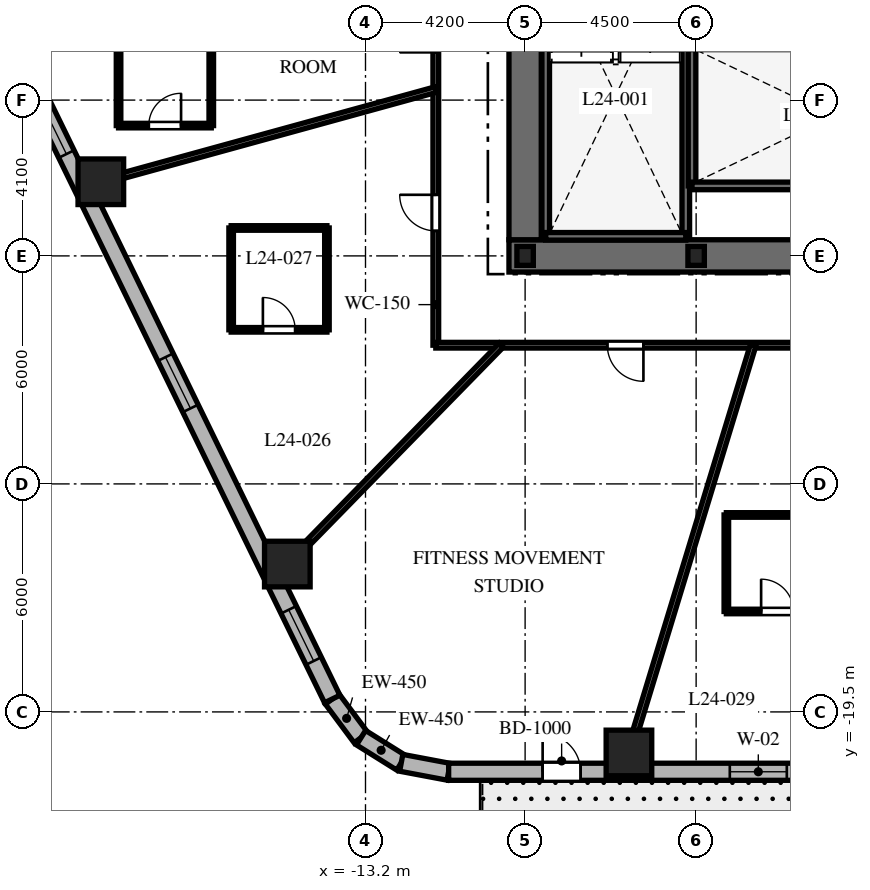
"""IFC4 building model, lengths in metres.
Left out: names, types, materials, properties, quantities, classifications, styles, units other than length and angle.
Written with IfcOpenShell. Run it as: python <this file> out.ifc"""

import sys

from ifc_helpers import new_model, si_unit, direction, frame, frame_2d, origin, origin_2d, place, context, subcontext, project, spatial, rectangle, i_section, extrude, element, fill, save


model = new_model("IFC4")
c1 = context("Model", 3, precision=1e-05, world=origin(), true_north=direction((0.0, 1.0)))
c2 = subcontext(c1, "Body", "Model", "MODEL_VIEW")
j1 = project(units=[si_unit("LENGTHUNIT", "METRE"), si_unit("PLANEANGLEUNIT", "RADIAN")], contexts=[c1])
p1 = place(None, origin())
s1 = spatial("IfcSite", under=j1, at=p1, CompositionType="ELEMENT")
p2 = place(p1, origin())
s2 = spatial("IfcBuilding", under=s1, at=p2, CompositionType="ELEMENT")
p3 = place(p2, frame((0.0, 0.0, 102.5)))
s3 = spatial("IfcBuildingStorey", under=s2, at=p3, CompositionType="ELEMENT", Elevation=102.5)
p4 = place(p3, frame((-9.425, -7.5, 0.0), z_axis=(0.0, 0.0, 1.0), x_axis=(1.0, 0.0, 0.0)))
e1 = element("IfcWall", 1, at=p4, inside=s3, PredefinedType="SHEAR", context=c2, shape_type="SweptSolid", body=[
    extrude(rectangle(XDim=18.85, YDim=0.85, at=frame_2d((9.425, 0.0))), origin(), (0.0, 0.0, 1.0), 3.7),
])
p5 = place(p4, frame((9.475, 0.0, 0.0)))
e2 = element("IfcOpeningElement", 2, at=p5, cuts=e1, PredefinedType="OPENING", context=c2, shape_type="SweptSolid", body=[
    extrude(rectangle(XDim=1.0, YDim=2.15, at=frame_2d((0.5, 1.075))), frame((0.0, 0.435, 0.0), z_axis=(0.0, -1.0, 0.0), x_axis=(1.0, 0.0, 0.0)), (0.0, 0.0, 1.0), 0.87),
])
p6 = place(p3, frame((-9.0, -7.075, 0.0), z_axis=(0.0, 0.0, 1.0), x_axis=(0.0, 1.0, 0.0)))
e3 = element("IfcWall", 3, at=p6, inside=s3, PredefinedType="SHEAR", context=c2, shape_type="SweptSolid", body=[
    extrude(rectangle(XDim=14.15, YDim=0.85, at=frame_2d((7.075, 0.0))), origin(), (0.0, 0.0, 1.0), 3.7),
])
p7 = place(p6, frame((10.2, 0.0, 0.0)))
e4 = element("IfcOpeningElement", 4, at=p7, cuts=e3, PredefinedType="OPENING", context=c2, shape_type="SweptSolid", body=[
    extrude(rectangle(XDim=1.05, YDim=2.15, at=frame_2d((0.525, 1.075))), frame((0.0, 0.435, 0.0), z_axis=(0.0, -1.0, 0.0), x_axis=(1.0, 0.0, 0.0)), (0.0, 0.0, 1.0), 0.87),
])
for number, where, z_axis, x_axis in (
    (5, (-8.458, -6.985, 0.0), (0.0, 0.0, 1.0), (0.0, 1.0, 0.0)),
    (6, (-4.772, -6.985, 0.0), (0.0, 0.0, 1.0), (0.0, 1.0, 0.0)),
):
    element("IfcWall", number, at=place(p3, frame(where, z_axis=z_axis, x_axis=x_axis)), inside=s3, PredefinedType="SHEAR", context=c2, shape_type="SweptSolid", body=[
        extrude(rectangle(XDim=9.143, YDim=0.2, at=frame_2d((4.572, 0.0))), origin(), (0.0, 0.0, 1.0), 3.7),
    ])
for number, where, z_axis, x_axis in (
    (7, (-8.458, -6.985, 0.0), (0.0, 0.0, 1.0), (1.0, 0.0, 0.0)),
    (8, (-4.608, -5.658, 0.0), (0.0, 0.0, 1.0), (0.0, 1.0, 0.0)),
):
    element("IfcWall", number, at=place(p3, frame(where, z_axis=z_axis, x_axis=x_axis)), inside=s3, PredefinedType="SHEAR", context=c2, shape_type="SweptSolid", body=[
        extrude(rectangle(XDim=3.686, YDim=0.2, at=frame_2d((1.843, 0.0))), origin(), (0.0, 0.0, 1.0), 3.7),
    ])
p8 = place(p3, frame((-4.608, -5.658, 0.0), z_axis=(0.0, 0.0, 1.0), x_axis=(1.0, 0.0, 0.0)))
e9 = element("IfcWall", 9, at=p8, inside=s3, PredefinedType="SHEAR", context=c2, shape_type="SweptSolid", body=[
    extrude(rectangle(XDim=9.166, YDim=0.2, at=frame_2d((4.583, 0.0))), origin(), (0.0, 0.0, 1.0), 3.7),
])
p9 = place(p8, frame((7.45, 0.0, 0.0)))
e10 = element("IfcOpeningElement", 10, at=p9, cuts=e9, PredefinedType="OPENING", context=c2, shape_type="SweptSolid", body=[
    extrude(rectangle(XDim=1.0, YDim=2.15, at=frame_2d((0.5, 1.075))), frame((0.0, 0.11, 0.0), z_axis=(0.0, -1.0, 0.0), x_axis=(1.0, 0.0, 0.0)), (0.0, 0.0, 1.0), 0.22),
])
for number, where, z_axis, x_axis in (
    (11, (-9.0, -7.5, 0.0), (0.0, 0.0, 1.0), (1.0, 0.0, 0.0)),
    (12, (-4.5, -7.5, 0.0), (0.0, 0.0, 1.0), (1.0, 0.0, 0.0)),
):
    element("IfcColumn", number, at=place(p3, frame(where, z_axis=z_axis, x_axis=x_axis)), inside=s3, PredefinedType="COLUMN", context=c2, shape_type="SweptSolid", body=[
        extrude(i_section(OverallWidth=0.432, OverallDepth=0.498, WebThickness=0.056, FlangeThickness=0.089, at=origin_2d()), origin(), (0.0, 0.0, 1.0), 3.7),
    ])
for number, where, z_axis, x_axis in (
    (13, (-6.268, -20.58, 0.0), (0.0, 0.0, 1.0), (1.0, 0.0, 0.0)),
    (14, (-20.164, -5.549, 0.0), (0.0, 0.0, 1.0), (1.0, 0.0, 0.0)),
    (15, (-15.257, -15.609, 0.0), (0.0, 0.0, 1.0), (1.0, 0.0, 0.0)),
):
    element("IfcColumn", number, at=place(p3, frame(where, z_axis=z_axis, x_axis=x_axis)), inside=s3, PredefinedType="COLUMN", context=c2, shape_type="SweptSolid", body=[
        extrude(rectangle(XDim=1.2, YDim=1.2, at=origin_2d()), origin(), (0.0, 0.0, 1.0), 3.7),
    ])
p10 = place(p3, frame((-14.076, -19.161, 0.0), z_axis=(0.0, 0.0, 1.0), x_axis=(0.597226657159, -0.802072515412, 0.0)))
e16 = element("IfcWall", 16, at=p10, inside=s3, PredefinedType="SOLIDWALL", context=c2, shape_type="SweptSolid", body=[
    extrude(rectangle(XDim=1.269, YDim=0.45, at=frame_2d((0.635, 0.0))), origin(), (0.0, 0.0, 1.0), 3.4),
])
p11 = place(p3, frame((-13.318, -20.179, 0.0), z_axis=(0.0, 0.0, 1.0), x_axis=(0.848031272749, -0.529946186362, 0.0)))
e17 = element("IfcWall", 17, at=p11, inside=s3, PredefinedType="SOLIDWALL", context=c2, shape_type="SweptSolid", body=[
    extrude(rectangle(XDim=1.248, YDim=0.45, at=frame_2d((0.624, 0.0))), origin(), (0.0, 0.0, 1.0), 3.4),
])
p12 = place(p3, frame((-12.259, -20.84, 0.0), z_axis=(0.0, 0.0, 1.0), x_axis=(0.982730354425, -0.185043374624, 0.0)))
e18 = element("IfcWall", 18, at=p12, inside=s3, PredefinedType="SOLIDWALL", context=c2, shape_type="SweptSolid", body=[
    extrude(rectangle(XDim=1.269, YDim=0.45, at=frame_2d((0.635, 0.0))), origin(), (0.0, 0.0, 1.0), 3.4),
])
p13 = place(p3, frame((-11.012, -21.075, 0.0), z_axis=(0.0, 0.0, 1.0), x_axis=(1.0, 0.0, 0.0)))
e19 = element("IfcWall", 19, at=p13, inside=s3, PredefinedType="SOLIDWALL", context=c2, shape_type="SweptSolid", body=[
    extrude(rectangle(XDim=23.782, YDim=0.45, at=frame_2d((11.891, 0.0))), origin(), (0.0, 0.0, 1.0), 3.4),
])
p14 = place(p13, frame((2.473, 0.0, 0.0)))
e20 = element("IfcOpeningElement", 20, at=p14, cuts=e19, PredefinedType="OPENING", context=c2, shape_type="SweptSolid", body=[
    extrude(rectangle(XDim=1.0, YDim=2.15, at=frame_2d((0.5, 1.075))), frame((0.0, 0.235, 0.0), z_axis=(0.0, -1.0, 0.0), x_axis=(1.0, 0.0, 0.0)), (0.0, 0.0, 1.0), 0.47),
])
p15 = place(p13, frame((7.398, 0.0, 0.8)))
e21 = element("IfcOpeningElement", 21, at=p15, cuts=e19, PredefinedType="OPENING", context=c2, shape_type="SweptSolid", body=[
    extrude(rectangle(XDim=1.5, YDim=1.8, at=frame_2d((0.75, 0.9))), frame((0.0, 0.235, 0.0), z_axis=(0.0, -1.0, 0.0), x_axis=(1.0, 0.0, 0.0)), (0.0, 0.0, 1.0), 0.47),
])
p16 = place(p13, frame((13.966, 0.0, 0.8)))
e22 = element("IfcOpeningElement", 22, at=p16, cuts=e19, PredefinedType="OPENING", context=c2, shape_type="SweptSolid", body=[
    extrude(rectangle(XDim=1.5, YDim=1.8, at=frame_2d((0.75, 0.9))), frame((0.0, 0.235, 0.0), z_axis=(0.0, -1.0, 0.0), x_axis=(1.0, 0.0, 0.0)), (0.0, 0.0, 1.0), 0.47),
])
p17 = place(p13, frame((20.741, 0.0, 0.8)))
e23 = element("IfcOpeningElement", 23, at=p17, cuts=e19, PredefinedType="OPENING", context=c2, shape_type="SweptSolid", body=[
    extrude(rectangle(XDim=1.5, YDim=1.8, at=frame_2d((0.75, 0.9))), frame((0.0, 0.235, 0.0), z_axis=(0.0, -1.0, 0.0), x_axis=(1.0, 0.0, 0.0)), (0.0, 0.0, 1.0), 0.47),
])
p18 = place(p3, frame((-22.238, -2.427, 0.0), z_axis=(0.0, 0.0, 1.0), x_axis=(0.438374803278, -0.898792262901, 0.0)))
e24 = element("IfcWall", 24, at=p18, inside=s3, PredefinedType="SOLIDWALL", context=c2, shape_type="SweptSolid", body=[
    extrude(rectangle(XDim=18.618, YDim=0.45, at=frame_2d((9.309, 0.0))), origin(), (0.0, 0.0, 1.0), 3.4),
])
p19 = place(p18, frame((1.163, 0.0, 0.8)))
e25 = element("IfcOpeningElement", 25, at=p19, cuts=e24, PredefinedType="OPENING", context=c2, shape_type="SweptSolid", body=[
    extrude(rectangle(XDim=1.5, YDim=1.8, at=frame_2d((0.75, 0.9))), frame((0.0, 0.235, 0.0), z_axis=(0.0, -1.0, 0.0), x_axis=(1.0, 0.0, 0.0)), (0.0, 0.0, 1.0), 0.47),
])
p20 = place(p18, frame((8.61, 0.0, 0.8)))
e26 = element("IfcOpeningElement", 26, at=p20, cuts=e24, PredefinedType="OPENING", context=c2, shape_type="SweptSolid", body=[
    extrude(rectangle(XDim=1.5, YDim=1.8, at=frame_2d((0.75, 0.9))), frame((0.0, 0.235, 0.0), z_axis=(0.0, -1.0, 0.0), x_axis=(1.0, 0.0, 0.0)), (0.0, 0.0, 1.0), 0.47),
])
p21 = place(p18, frame((16.006, 0.0, 0.8)))
e27 = element("IfcOpeningElement", 27, at=p21, cuts=e24, PredefinedType="OPENING", context=c2, shape_type="SweptSolid", body=[
    extrude(rectangle(XDim=1.5, YDim=1.8, at=frame_2d((0.75, 0.9))), frame((0.0, 0.235, 0.0), z_axis=(0.0, -1.0, 0.0), x_axis=(1.0, 0.0, 0.0)), (0.0, 0.0, 1.0), 0.47),
])
p22 = place(p3, frame((-11.35, -9.85, 0.0), z_axis=(0.0, 0.0, 1.0), x_axis=(0.0, 1.0, 0.0)))
e28 = element("IfcWall", 28, at=p22, inside=s3, PredefinedType="PARTITIONING", context=c2, shape_type="SweptSolid", body=[
    extrude(rectangle(XDim=19.7, YDim=0.15, at=frame_2d((9.85, 0.0))), origin(), (0.0, 0.0, 1.0), 2.84),
])
p23 = place(p22, frame((16.711, 0.0, 0.0)))
e29 = element("IfcOpeningElement", 29, at=p23, cuts=e28, PredefinedType="OPENING", context=c2, shape_type="SweptSolid", body=[
    extrude(rectangle(XDim=0.95, YDim=2.03, at=frame_2d((0.475, 1.015))), frame((0.0, 0.085, 0.0), z_axis=(0.0, -1.0, 0.0), x_axis=(1.0, 0.0, 0.0)), (0.0, 0.0, 1.0), 0.17),
])
p24 = place(p22, frame((12.968, 0.0, 0.0)))
e30 = element("IfcOpeningElement", 30, at=p24, cuts=e28, PredefinedType="OPENING", context=c2, shape_type="SweptSolid", body=[
    extrude(rectangle(XDim=0.9, YDim=2.03, at=frame_2d((0.45, 1.015))), frame((0.0, 0.085, 0.0), z_axis=(0.0, -1.0, 0.0), x_axis=(1.0, 0.0, 0.0)), (0.0, 0.0, 1.0), 0.17),
])
p25 = place(p22, frame((10.325, 0.0, 0.0)))
e31 = element("IfcOpeningElement", 31, at=p25, cuts=e28, PredefinedType="OPENING", context=c2, shape_type="SweptSolid", body=[
    extrude(rectangle(XDim=0.9, YDim=2.03, at=frame_2d((0.45, 1.015))), frame((0.0, 0.085, 0.0), z_axis=(0.0, -1.0, 0.0), x_axis=(1.0, 0.0, 0.0)), (0.0, 0.0, 1.0), 0.17),
])
p26 = place(p22, frame((7.706, 0.0, 0.0)))
e32 = element("IfcOpeningElement", 32, at=p26, cuts=e28, PredefinedType="OPENING", context=c2, shape_type="SweptSolid", body=[
    extrude(rectangle(XDim=0.95, YDim=2.03, at=frame_2d((0.475, 1.015))), frame((0.0, 0.085, 0.0), z_axis=(0.0, -1.0, 0.0), x_axis=(1.0, 0.0, 0.0)), (0.0, 0.0, 1.0), 0.17),
])
p27 = place(p22, frame((3.008, 0.0, 0.0)))
e33 = element("IfcOpeningElement", 33, at=p27, cuts=e28, PredefinedType="OPENING", context=c2, shape_type="SweptSolid", body=[
    extrude(rectangle(XDim=0.95, YDim=2.03, at=frame_2d((0.475, 1.015))), frame((0.0, 0.085, 0.0), z_axis=(0.0, -1.0, 0.0), x_axis=(1.0, 0.0, 0.0)), (0.0, 0.0, 1.0), 0.17),
])
p28 = place(p3, frame((11.35, -9.85, 0.0), z_axis=(0.0, 0.0, 1.0), x_axis=(-1.0, 0.0, 0.0)))
e34 = element("IfcWall", 34, at=p28, inside=s3, PredefinedType="PARTITIONING", context=c2, shape_type="SweptSolid", body=[
    extrude(rectangle(XDim=22.7, YDim=0.15, at=frame_2d((11.35, 0.0))), origin(), (0.0, 0.0, 1.0), 2.84),
])
p29 = place(p28, frame((17.237, 0.0, 0.0)))
e35 = element("IfcOpeningElement", 35, at=p29, cuts=e34, PredefinedType="OPENING", context=c2, shape_type="SweptSolid", body=[
    extrude(rectangle(XDim=0.95, YDim=2.03, at=frame_2d((0.475, 1.015))), frame((0.0, 0.085, 0.0), z_axis=(0.0, -1.0, 0.0), x_axis=(1.0, 0.0, 0.0)), (0.0, 0.0, 1.0), 0.17),
])
p30 = place(p28, frame((12.39, 0.0, 0.0)))
e36 = element("IfcOpeningElement", 36, at=p30, cuts=e34, PredefinedType="OPENING", context=c2, shape_type="SweptSolid", body=[
    extrude(rectangle(XDim=0.95, YDim=2.03, at=frame_2d((0.475, 1.015))), frame((0.0, 0.085, 0.0), z_axis=(0.0, -1.0, 0.0), x_axis=(1.0, 0.0, 0.0)), (0.0, 0.0, 1.0), 0.17),
])
p31 = place(p28, frame((8.954, 0.0, 0.0)))
e37 = element("IfcOpeningElement", 37, at=p31, cuts=e34, PredefinedType="OPENING", context=c2, shape_type="SweptSolid", body=[
    extrude(rectangle(XDim=0.95, YDim=2.03, at=frame_2d((0.475, 1.015))), frame((0.0, 0.085, 0.0), z_axis=(0.0, -1.0, 0.0), x_axis=(1.0, 0.0, 0.0)), (0.0, 0.0, 1.0), 0.17),
])
p32 = place(p28, frame((5.522, 0.0, 0.0)))
e38 = element("IfcOpeningElement", 38, at=p32, cuts=e34, PredefinedType="OPENING", context=c2, shape_type="SweptSolid", body=[
    extrude(rectangle(XDim=0.9, YDim=2.03, at=frame_2d((0.45, 1.015))), frame((0.0, 0.085, 0.0), z_axis=(0.0, -1.0, 0.0), x_axis=(1.0, 0.0, 0.0)), (0.0, 0.0, 1.0), 0.17),
])
p33 = place(p28, frame((1.914, 0.0, 0.0)))
e39 = element("IfcOpeningElement", 39, at=p33, cuts=e34, PredefinedType="OPENING", context=c2, shape_type="SweptSolid", body=[
    extrude(rectangle(XDim=0.9, YDim=2.03, at=frame_2d((0.45, 1.015))), frame((0.0, 0.085, 0.0), z_axis=(0.0, -1.0, 0.0), x_axis=(1.0, 0.0, 0.0)), (0.0, 0.0, 1.0), 0.17),
])
p34 = place(p3, frame((-11.35, -3.123, 0.0), z_axis=(0.0, 0.0, 1.0), x_axis=(-0.964151983214, -0.265350623261, 0.0)))
e40 = element("IfcWall", 40, at=p34, inside=s3, PredefinedType="PARTITIONING", context=c2, shape_type="SweptSolid", body=[
    extrude(rectangle(XDim=9.645, YDim=0.15, at=frame_2d((4.823, 0.0))), origin(), (0.0, 0.0, 1.0), 2.54),
])
p35 = place(p3, frame((-9.628, -9.85, 0.0), z_axis=(0.0, 0.0, 1.0), x_axis=(-0.698992824326, -0.715128681805, 0.0)))
e41 = element("IfcWall", 41, at=p35, inside=s3, PredefinedType="PARTITIONING", context=c2, shape_type="SweptSolid", body=[
    extrude(rectangle(XDim=8.579, YDim=0.15, at=frame_2d((4.29, 0.0))), origin(), (0.0, 0.0, 1.0), 2.54),
])
p36 = place(p3, frame((-3.0, -9.85, 0.0), z_axis=(0.0, 0.0, 1.0), x_axis=(-0.291352035382, -0.95661590593, 0.0)))
e42 = element("IfcWall", 42, at=p36, inside=s3, PredefinedType="PARTITIONING", context=c2, shape_type="SweptSolid", body=[
    extrude(rectangle(XDim=11.734, YDim=0.15, at=frame_2d((5.867, 0.0))), origin(), (0.0, 0.0, 1.0), 2.54),
])
p37 = place(p3, frame((-19.698, -4.071, 0.0), z_axis=(0.0, 0.0, 1.0), x_axis=(1.0, 0.0, 0.0)))
e43 = element("IfcWall", 43, at=p37, inside=s3, PredefinedType="PARTITIONING", context=c2, shape_type="SweptSolid", body=[
    extrude(rectangle(XDim=2.44, YDim=0.12, at=frame_2d((1.22, 0.0))), origin(), (0.0, 0.0, 1.0), 3.4),
])
p38 = place(p37, frame((0.795, 0.0, 0.0)))
e44 = element("IfcOpeningElement", 44, at=p38, cuts=e43, PredefinedType="OPENING", context=c2, shape_type="SweptSolid", body=[
    extrude(rectangle(XDim=0.85, YDim=2.03, at=frame_2d((0.425, 1.015))), frame((0.0, 0.07, 0.0), z_axis=(0.0, -1.0, 0.0), x_axis=(1.0, 0.0, 0.0)), (0.0, 0.0, 1.0), 0.14),
])
for number, where, z_axis, x_axis in (
    (45, (-17.258, -4.071, 0.0), (0.0, 0.0, 1.0), (0.0, 1.0, 0.0)),
    (46, (-19.698, -1.461, 0.0), (0.0, 0.0, 1.0), (0.0, -1.0, 0.0)),
):
    element("IfcWall", number, at=place(p3, frame(where, z_axis=z_axis, x_axis=x_axis)), inside=s3, PredefinedType="PARTITIONING", context=c2, shape_type="SweptSolid", body=[
        extrude(rectangle(XDim=2.61, YDim=0.12, at=frame_2d((1.305, 0.0))), origin(), (0.0, 0.0, 1.0), 3.4),
    ])
p39 = place(p3, frame((-16.735, -9.445, 0.0), z_axis=(0.0, 0.0, 1.0), x_axis=(1.0, 0.0, 0.0)))
e47 = element("IfcWall", 47, at=p39, inside=s3, PredefinedType="PARTITIONING", context=c2, shape_type="SweptSolid", body=[
    extrude(rectangle(XDim=2.52, YDim=0.12, at=frame_2d((1.26, 0.0))), origin(), (0.0, 0.0, 1.0), 2.927),
])
p40 = place(p39, frame((0.835, 0.0, 0.0)))
e48 = element("IfcOpeningElement", 48, at=p40, cuts=e47, PredefinedType="OPENING", context=c2, shape_type="SweptSolid", body=[
    extrude(rectangle(XDim=0.85, YDim=2.03, at=frame_2d((0.425, 1.015))), frame((0.0, 0.07, 0.0), z_axis=(0.0, -1.0, 0.0), x_axis=(1.0, 0.0, 0.0)), (0.0, 0.0, 1.0), 0.14),
])
p41 = place(p3, frame((-14.215, -9.445, 0.0), z_axis=(0.0, 0.0, 1.0), x_axis=(0.0, 1.0, 0.0)))
e49 = element("IfcWall", 49, at=p41, inside=s3, PredefinedType="PARTITIONING", context=c2, shape_type="SweptSolid", body=[
    extrude(rectangle(XDim=2.68, YDim=0.12, at=frame_2d((1.34, 0.0))), origin(), (0.0, 0.0, 1.0), 3.4),
])
p42 = place(p3, frame((-14.215, -6.765, 0.0), z_axis=(0.0, 0.0, 1.0), x_axis=(-1.0, 0.0, 0.0)))
e50 = element("IfcWall", 50, at=p42, inside=s3, PredefinedType="PARTITIONING", context=c2, shape_type="SweptSolid", body=[
    extrude(rectangle(XDim=2.52, YDim=0.12, at=frame_2d((1.26, 0.0))), origin(), (0.0, 0.0, 1.0), 2.84),
])
p43 = place(p3, frame((-16.735, -6.765, 0.0), z_axis=(0.0, 0.0, 1.0), x_axis=(0.0, -1.0, 0.0)))
e51 = element("IfcWall", 51, at=p43, inside=s3, PredefinedType="PARTITIONING", context=c2, shape_type="SweptSolid", body=[
    extrude(rectangle(XDim=2.68, YDim=0.12, at=frame_2d((1.34, 0.0))), origin(), (0.0, 0.0, 1.0), 3.4),
])
p44 = place(p3, frame((-3.705, -16.857, 0.0), z_axis=(0.0, 0.0, 1.0), x_axis=(1.0, 0.0, 0.0)))
e52 = element("IfcWall", 52, at=p44, inside=s3, PredefinedType="PARTITIONING", context=c2, shape_type="SweptSolid", body=[
    extrude(rectangle(XDim=2.68, YDim=0.12, at=frame_2d((1.34, 0.0))), origin(), (0.0, 0.0, 1.0), 3.4),
])
p45 = place(p44, frame((0.915, 0.0, 0.0)))
e53 = element("IfcOpeningElement", 53, at=p45, cuts=e52, PredefinedType="OPENING", context=c2, shape_type="SweptSolid", body=[
    extrude(rectangle(XDim=0.85, YDim=2.03, at=frame_2d((0.425, 1.015))), frame((0.0, 0.07, 0.0), z_axis=(0.0, -1.0, 0.0), x_axis=(1.0, 0.0, 0.0)), (0.0, 0.0, 1.0), 0.14),
])
p46 = place(p3, frame((-1.025, -14.317, 0.0), z_axis=(0.0, 0.0, 1.0), x_axis=(-1.0, 0.0, 0.0)))
e54 = element("IfcWall", 54, at=p46, inside=s3, PredefinedType="PARTITIONING", context=c2, shape_type="SweptSolid", body=[
    extrude(rectangle(XDim=2.68, YDim=0.12, at=frame_2d((1.34, 0.0))), origin(), (0.0, 0.0, 1.0), 3.4),
])
p47 = place(p3, frame((-3.705, -14.317, 0.0), z_axis=(0.0, 0.0, 1.0), x_axis=(0.0, -1.0, 0.0)))
e55 = element("IfcWall", 55, at=p47, inside=s3, PredefinedType="PARTITIONING", context=c2, shape_type="SweptSolid", body=[
    extrude(rectangle(XDim=2.54, YDim=0.12, at=frame_2d((1.27, 0.0))), origin(), (0.0, 0.0, 1.0), 2.84),
])
p48 = place(p14, origin())
e56 = element("IfcDoor", 56, at=p48, inside=s3, OperationType="SINGLE_SWING_LEFT", PredefinedType="DOOR", context=c2, shape_type="SweptSolid", body=[
    extrude(rectangle(XDim=1.0, YDim=2.15, at=frame_2d((0.5, 1.075))), frame((0.0, 0.025, 0.0), z_axis=(0.0, -1.0, 0.0), x_axis=(1.0, 0.0, 0.0)), (0.0, 0.0, 1.0), 0.05),
])
fill(e20, e56)
p49 = place(p15, origin())
e57 = element("IfcWindow", 57, at=p49, inside=s3, PartitioningType="SINGLE_PANEL", PredefinedType="WINDOW", context=c2, shape_type="SweptSolid", body=[
    extrude(rectangle(XDim=1.5, YDim=1.8, at=frame_2d((0.75, 0.9))), frame((0.0, 0.03, 0.0), z_axis=(0.0, -1.0, 0.0), x_axis=(1.0, 0.0, 0.0)), (0.0, 0.0, 1.0), 0.06),
])
fill(e21, e57)
p50 = place(p19, origin())
e58 = element("IfcWindow", 58, at=p50, inside=s3, PartitioningType="SINGLE_PANEL", PredefinedType="WINDOW", context=c2, shape_type="SweptSolid", body=[
    extrude(rectangle(XDim=1.5, YDim=1.8, at=frame_2d((0.75, 0.9))), frame((0.0, 0.03, 0.0), z_axis=(0.0, -1.0, 0.0), x_axis=(1.0, 0.0, 0.0)), (0.0, 0.0, 1.0), 0.06),
])
fill(e25, e58)
p51 = place(p20, origin())
e59 = element("IfcWindow", 59, at=p51, inside=s3, PartitioningType="SINGLE_PANEL", PredefinedType="WINDOW", context=c2, shape_type="SweptSolid", body=[
    extrude(rectangle(XDim=1.5, YDim=1.8, at=frame_2d((0.75, 0.9))), frame((0.0, 0.03, 0.0), z_axis=(0.0, -1.0, 0.0), x_axis=(1.0, 0.0, 0.0)), (0.0, 0.0, 1.0), 0.06),
])
fill(e26, e59)
p52 = place(p21, origin())
e60 = element("IfcWindow", 60, at=p52, inside=s3, PartitioningType="SINGLE_PANEL", PredefinedType="WINDOW", context=c2, shape_type="SweptSolid", body=[
    extrude(rectangle(XDim=1.5, YDim=1.8, at=frame_2d((0.75, 0.9))), frame((0.0, 0.03, 0.0), z_axis=(0.0, -1.0, 0.0), x_axis=(1.0, 0.0, 0.0)), (0.0, 0.0, 1.0), 0.06),
])
fill(e27, e60)
p53 = place(p26, origin())
e61 = element("IfcDoor", 61, at=p53, inside=s3, OperationType="SINGLE_SWING_LEFT", PredefinedType="DOOR", context=c2, shape_type="SweptSolid", body=[
    extrude(rectangle(XDim=0.95, YDim=2.03, at=frame_2d((0.475, 1.015))), frame((0.0, 0.025, 0.0), z_axis=(0.0, -1.0, 0.0), x_axis=(1.0, 0.0, 0.0)), (0.0, 0.0, 1.0), 0.05),
])
fill(e32, e61)
p54 = place(p38, origin())
e62 = element("IfcDoor", 62, at=p54, inside=s3, OperationType="SINGLE_SWING_RIGHT", PredefinedType="DOOR", context=c2, shape_type="SweptSolid", body=[
    extrude(rectangle(XDim=0.85, YDim=2.03, at=frame_2d((0.425, 1.015))), frame((0.0, 0.025, 0.0), z_axis=(0.0, -1.0, 0.0), x_axis=(1.0, 0.0, 0.0)), (0.0, 0.0, 1.0), 0.05),
])
fill(e44, e62)
p55 = place(p27, origin())
e63 = element("IfcDoor", 63, at=p55, inside=s3, OperationType="SINGLE_SWING_RIGHT", PredefinedType="DOOR", context=c2, shape_type="SweptSolid", body=[
    extrude(rectangle(XDim=0.95, YDim=2.03, at=frame_2d((0.475, 1.015))), frame((0.0, 0.025, 0.0), z_axis=(0.0, -1.0, 0.0), x_axis=(1.0, 0.0, 0.0)), (0.0, 0.0, 1.0), 0.05),
])
fill(e33, e63)
p56 = place(p40, origin())
e64 = element("IfcDoor", 64, at=p56, inside=s3, OperationType="SINGLE_SWING_LEFT", PredefinedType="DOOR", context=c2, shape_type="SweptSolid", body=[
    extrude(rectangle(XDim=0.85, YDim=2.03, at=frame_2d((0.425, 1.015))), frame((0.0, 0.025, 0.0), z_axis=(0.0, -1.0, 0.0), x_axis=(1.0, 0.0, 0.0)), (0.0, 0.0, 1.0), 0.05),
])
fill(e48, e64)
p57 = place(p29, origin())
e65 = element("IfcDoor", 65, at=p57, inside=s3, OperationType="SINGLE_SWING_LEFT", PredefinedType="DOOR", context=c2, shape_type="SweptSolid", body=[
    extrude(rectangle(XDim=0.95, YDim=2.03, at=frame_2d((0.475, 1.015))), frame((0.0, 0.025, 0.0), z_axis=(0.0, -1.0, 0.0), x_axis=(1.0, 0.0, 0.0)), (0.0, 0.0, 1.0), 0.05),
])
fill(e35, e65)
p58 = place(p45, origin())
e66 = element("IfcDoor", 66, at=p58, inside=s3, OperationType="SINGLE_SWING_LEFT", PredefinedType="DOOR", context=c2, shape_type="SweptSolid", body=[
    extrude(rectangle(XDim=0.85, YDim=2.03, at=frame_2d((0.425, 1.015))), frame((0.0, 0.025, 0.0), z_axis=(0.0, -1.0, 0.0), x_axis=(1.0, 0.0, 0.0)), (0.0, 0.0, 1.0), 0.05),
])
fill(e53, e66)
save(model, sys.argv[1])
